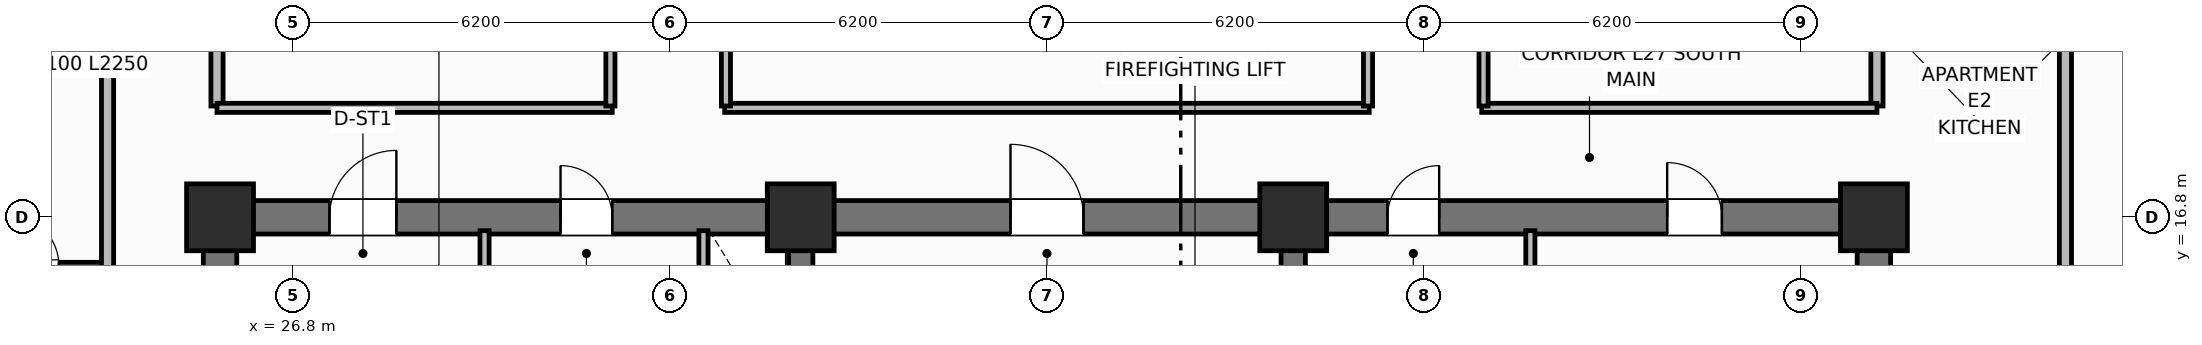
"""IFC4 building model, lengths in metres.
Left out: names, types, materials, properties, quantities, classifications, styles, units other than length and angle.
Written with IfcOpenShell. Run it as: python <this file> out.ifc"""

import sys

from ifc_helpers import new_model, si_unit, direction, frame, frame_2d, origin, origin_2d, place, context, subcontext, project, spatial, rectangle, extrude, element, fill, save


model = new_model("IFC4")
c1 = context("Model", 3, precision=1e-05, world=origin(), true_north=direction((0.0, 1.0)))
c2 = subcontext(c1, "Body", "Model", "MODEL_VIEW")
j1 = project(units=[si_unit("LENGTHUNIT", "METRE"), si_unit("PLANEANGLEUNIT", "RADIAN")], contexts=[c1])
p1 = place(None, origin())
s1 = spatial("IfcSite", under=j1, at=p1, CompositionType="ELEMENT")
p2 = place(p1, origin())
s2 = spatial("IfcBuilding", under=s1, at=p2, CompositionType="ELEMENT")
p3 = place(p2, frame((0.0, 0.0, 110.5)))
s3 = spatial("IfcBuildingStorey", under=s2, at=p3, CompositionType="ELEMENT", Elevation=110.5)
for number, where, z_axis, x_axis in (
    (1, (25.6, 10.875, 0.0), (0.0, 0.0, 1.0), (0.0, 1.0, 0.0)),
    (2, (52.8, 10.875, 0.0), (0.0, 0.0, 1.0), (0.0, 1.0, 0.0)),
):
    element("IfcWall", number, at=place(p3, frame(where, z_axis=z_axis, x_axis=x_axis)), inside=s3, PredefinedType="SHEAR", context=c2, shape_type="SweptSolid", body=[
        extrude(rectangle(XDim=5.65, YDim=0.55, at=frame_2d((2.825, 0.0))), origin(), (0.0, 0.0, 1.0), 3.7),
    ])
p4 = place(p3, frame((25.6, 16.8, 0.0), z_axis=(0.0, 0.0, 1.0), x_axis=(1.0, 0.0, 0.0)))
e3 = element("IfcWall", 3, at=p4, inside=s3, PredefinedType="SHEAR", context=c2, shape_type="SweptSolid", body=[
    extrude(rectangle(XDim=27.2, YDim=0.55, at=frame_2d((13.6, 0.0))), origin(), (0.0, 0.0, 1.0), 3.7),
])
p5 = place(p4, frame((1.8, 0.0, 0.0)))
e4 = element("IfcOpeningElement", 4, at=p5, cuts=e3, PredefinedType="OPENING", context=c2, shape_type="SweptSolid", body=[
    extrude(rectangle(XDim=1.1, YDim=2.15, at=frame_2d((0.55, 1.075))), frame((0.0, 0.285, 0.0), z_axis=(0.0, -1.0, 0.0), x_axis=(1.0, 0.0, 0.0)), (0.0, 0.0, 1.0), 0.57),
])
p6 = place(p4, frame((5.6, 0.0, 0.0)))
e5 = element("IfcOpeningElement", 5, at=p6, cuts=e3, PredefinedType="OPENING", context=c2, shape_type="SweptSolid", body=[
    extrude(rectangle(XDim=0.85, YDim=2.1, at=frame_2d((0.425, 1.05))), frame((0.0, 0.285, 0.0), z_axis=(0.0, -1.0, 0.0), x_axis=(1.0, 0.0, 0.0)), (0.0, 0.0, 1.0), 0.57),
])
p7 = place(p4, frame((13.0, 0.0, 0.0)))
e6 = element("IfcOpeningElement", 6, at=p7, cuts=e3, PredefinedType="OPENING", context=c2, shape_type="SweptSolid", body=[
    extrude(rectangle(XDim=1.2, YDim=2.15, at=frame_2d((0.6, 1.075))), frame((0.0, 0.285, 0.0), z_axis=(0.0, -1.0, 0.0), x_axis=(1.0, 0.0, 0.0)), (0.0, 0.0, 1.0), 0.57),
])
p8 = place(p4, frame((19.2, 0.0, 0.0)))
e7 = element("IfcOpeningElement", 7, at=p8, cuts=e3, PredefinedType="OPENING", context=c2, shape_type="SweptSolid", body=[
    extrude(rectangle(XDim=0.85, YDim=2.1, at=frame_2d((0.425, 1.05))), frame((0.0, 0.285, 0.0), z_axis=(0.0, -1.0, 0.0), x_axis=(1.0, 0.0, 0.0)), (0.0, 0.0, 1.0), 0.57),
])
p9 = place(p4, frame((23.8, 0.0, 0.0)))
e8 = element("IfcOpeningElement", 8, at=p9, cuts=e3, PredefinedType="OPENING", context=c2, shape_type="SweptSolid", body=[
    extrude(rectangle(XDim=0.9, YDim=2.1, at=frame_2d((0.45, 1.05))), frame((0.0, 0.285, 0.0), z_axis=(0.0, -1.0, 0.0), x_axis=(1.0, 0.0, 0.0)), (0.0, 0.0, 1.0), 0.57),
])
for number, where, z_axis, x_axis in (
    (9, (35.15, 10.875, 0.0), (0.0, 0.0, 1.0), (0.0, 1.0, 0.0)),
    (10, (43.25, 10.875, 0.0), (0.0, 0.0, 1.0), (0.0, 1.0, 0.0)),
):
    element("IfcWall", number, at=place(p3, frame(where, z_axis=z_axis, x_axis=x_axis)), inside=s3, PredefinedType="SHEAR", context=c2, shape_type="SweptSolid", body=[
        extrude(rectangle(XDim=5.65, YDim=0.4, at=frame_2d((2.825, 0.0))), origin(), (0.0, 0.0, 1.0), 3.7),
    ])
for number, where, z_axis, x_axis in (
    (11, (25.6, 16.8, 0.0), (0.0, 0.0, 1.0), (1.0, 0.0, 0.0)),
    (12, (35.15, 16.8, 0.0), (0.0, 0.0, 1.0), (1.0, 0.0, 0.0)),
    (13, (43.25, 16.8, 0.0), (0.0, 0.0, 1.0), (1.0, 0.0, 0.0)),
    (14, (52.8, 16.8, 0.0), (0.0, 0.0, 1.0), (1.0, 0.0, 0.0)),
):
    element("IfcColumn", number, at=place(p3, frame(where, z_axis=z_axis, x_axis=x_axis)), inside=s3, PredefinedType="COLUMN", context=c2, shape_type="SweptSolid", body=[
        extrude(rectangle(XDim=1.1, YDim=1.1, at=origin_2d()), origin(), (0.0, 0.0, 1.0), 3.7),
    ])
p10 = place(p3, frame((29.95, 14.5, 0.0), z_axis=(0.0, 0.0, 1.0), x_axis=(0.0, 1.0, 0.0)))
e15 = element("IfcWall", 15, at=p10, inside=s3, PredefinedType="PARTITIONING", context=c2, shape_type="SweptSolid", body=[
    extrude(rectangle(XDim=2.08, YDim=0.15, at=frame_2d((1.04, 0.0))), origin(), (0.0, 0.0, 1.0), 2.53),
])
p11 = place(p3, frame((33.55, 14.5, 0.0), z_axis=(0.0, 0.0, 1.0), x_axis=(0.0, 1.0, 0.0)))
e16 = element("IfcWall", 16, at=p11, inside=s3, PredefinedType="PARTITIONING", context=c2, shape_type="SweptSolid", body=[
    extrude(rectangle(XDim=2.08, YDim=0.15, at=frame_2d((1.04, 0.0))), origin(), (0.0, 0.0, 1.0), 2.53),
])
p12 = place(p11, frame((0.55, 0.0, 0.0)))
e17 = element("IfcOpeningElement", 17, at=p12, cuts=e16, PredefinedType="OPENING", context=c2, shape_type="SweptSolid", body=[
    extrude(rectangle(XDim=0.85, YDim=2.05, at=frame_2d((0.425, 1.025))), frame((0.0, 0.085, 0.0), z_axis=(0.0, -1.0, 0.0), x_axis=(1.0, 0.0, 0.0)), (0.0, 0.0, 1.0), 0.17),
])
p13 = place(p3, frame((47.15, 10.95, 0.0), z_axis=(0.0, 0.0, 1.0), x_axis=(0.0, 1.0, 0.0)))
e18 = element("IfcWall", 18, at=p13, inside=s3, PredefinedType="PARTITIONING", context=c2, shape_type="SweptSolid", body=[
    extrude(rectangle(XDim=5.63, YDim=0.15, at=frame_2d((2.815, 0.0))), origin(), (0.0, 0.0, 1.0), 2.53),
])
for number, where, z_axis, x_axis in (
    (19, (25.55, 18.63, 0.0), (0.0, 0.0, 1.0), (0.0, 1.0, 0.0)),
    (20, (52.85, 18.63, 0.0), (0.0, 0.0, 1.0), (0.0, 1.0, 0.0)),
):
    element("IfcWall", number, at=place(p3, frame(where, z_axis=z_axis, x_axis=x_axis)), inside=s3, PredefinedType="PARTITIONING", context=c2, shape_type="SweptSolid", body=[
        extrude(rectangle(XDim=19.14, YDim=0.2, at=frame_2d((9.57, 0.0))), origin(), (0.0, 0.0, 1.0), 2.53),
    ])
p14 = place(p3, frame((25.55, 18.6, 0.0), z_axis=(0.0, 0.0, 1.0), x_axis=(1.0, 0.0, 0.0)))
e21 = element("IfcWall", 21, at=p14, inside=s3, PredefinedType="PARTITIONING", context=c2, shape_type="SweptSolid", body=[
    extrude(rectangle(XDim=6.5, YDim=0.15, at=frame_2d((3.25, 0.0))), origin(), (0.0, 0.0, 1.0), 2.53),
])
p15 = place(p3, frame((33.9, 18.6, 0.0), z_axis=(0.0, 0.0, 1.0), x_axis=(1.0, 0.0, 0.0)))
e22 = element("IfcWall", 22, at=p15, inside=s3, PredefinedType="PARTITIONING", context=c2, shape_type="SweptSolid", body=[
    extrude(rectangle(XDim=10.6, YDim=0.15, at=frame_2d((5.3, 0.0))), origin(), (0.0, 0.0, 1.0), 2.53),
])
p16 = place(p3, frame((46.35, 18.6, 0.0), z_axis=(0.0, 0.0, 1.0), x_axis=(1.0, 0.0, 0.0)))
e23 = element("IfcWall", 23, at=p16, inside=s3, PredefinedType="PARTITIONING", context=c2, shape_type="SweptSolid", body=[
    extrude(rectangle(XDim=6.5, YDim=0.15, at=frame_2d((3.25, 0.0))), origin(), (0.0, 0.0, 1.0), 2.53),
])
p17 = place(p3, frame((32.02, 18.63, 0.0), z_axis=(0.0, 0.0, 1.0), x_axis=(0.0, 1.0, 0.0)))
e24 = element("IfcWall", 24, at=p17, inside=s3, PredefinedType="PARTITIONING", context=c2, shape_type="SweptSolid", body=[
    extrude(rectangle(XDim=19.14, YDim=0.15, at=frame_2d((9.57, 0.0))), origin(), (0.0, 0.0, 1.0), 2.53),
])
p18 = place(p17, frame((5.5, 0.0, 0.0)))
e25 = element("IfcOpeningElement", 25, at=p18, cuts=e24, PredefinedType="OPENING", context=c2, shape_type="SweptSolid", body=[
    extrude(rectangle(XDim=1.0, YDim=2.15, at=frame_2d((0.5, 1.075))), frame((0.0, 0.085, 0.0), z_axis=(0.0, -1.0, 0.0), x_axis=(1.0, 0.0, 0.0)), (0.0, 0.0, 1.0), 0.17),
])
p19 = place(p3, frame((33.92, 18.63, 0.0), z_axis=(0.0, 0.0, 1.0), x_axis=(0.0, 1.0, 0.0)))
e26 = element("IfcWall", 26, at=p19, inside=s3, PredefinedType="PARTITIONING", context=c2, shape_type="SweptSolid", body=[
    extrude(rectangle(XDim=19.14, YDim=0.15, at=frame_2d((9.57, 0.0))), origin(), (0.0, 0.0, 1.0), 2.53),
])
p20 = place(p19, frame((2.4, 0.0, 0.0)))
e27 = element("IfcOpeningElement", 27, at=p20, cuts=e26, PredefinedType="OPENING", context=c2, shape_type="SweptSolid", body=[
    extrude(rectangle(XDim=1.0, YDim=2.15, at=frame_2d((0.5, 1.075))), frame((0.0, 0.085, 0.0), z_axis=(0.0, -1.0, 0.0), x_axis=(1.0, 0.0, 0.0)), (0.0, 0.0, 1.0), 0.17),
])
p21 = place(p3, frame((44.48, 18.63, 0.0), z_axis=(0.0, 0.0, 1.0), x_axis=(0.0, 1.0, 0.0)))
e28 = element("IfcWall", 28, at=p21, inside=s3, PredefinedType="PARTITIONING", context=c2, shape_type="SweptSolid", body=[
    extrude(rectangle(XDim=19.14, YDim=0.15, at=frame_2d((9.57, 0.0))), origin(), (0.0, 0.0, 1.0), 2.53),
])
p22 = place(p21, frame((10.804, 0.0, 0.0)))
e29 = element("IfcOpeningElement", 29, at=p22, cuts=e28, PredefinedType="OPENING", context=c2, shape_type="SweptSolid", body=[
    extrude(rectangle(XDim=1.0, YDim=2.15, at=frame_2d((0.5, 1.075))), frame((0.0, 0.085, 0.0), z_axis=(0.0, -1.0, 0.0), x_axis=(1.0, 0.0, 0.0)), (0.0, 0.0, 1.0), 0.17),
])
p23 = place(p3, frame((46.38, 18.63, 0.0), z_axis=(0.0, 0.0, 1.0), x_axis=(0.0, 1.0, 0.0)))
e30 = element("IfcWall", 30, at=p23, inside=s3, PredefinedType="PARTITIONING", context=c2, shape_type="SweptSolid", body=[
    extrude(rectangle(XDim=19.14, YDim=0.15, at=frame_2d((9.57, 0.0))), origin(), (0.0, 0.0, 1.0), 2.53),
])
p24 = place(p23, frame((5.5, 0.0, 0.0)))
e31 = element("IfcOpeningElement", 31, at=p24, cuts=e30, PredefinedType="OPENING", context=c2, shape_type="SweptSolid", body=[
    extrude(rectangle(XDim=1.0, YDim=2.15, at=frame_2d((0.5, 1.075))), frame((0.0, 0.085, 0.0), z_axis=(0.0, -1.0, 0.0), x_axis=(1.0, 0.0, 0.0)), (0.0, 0.0, 1.0), 0.17),
])
p25 = place(p3, frame((21.5, 16.0, 0.0), z_axis=(0.0, 0.0, 1.0), x_axis=(1.0, 0.0, 0.0)))
e32 = element("IfcWall", 32, at=p25, inside=s3, PredefinedType="PARTITIONING", context=c2, shape_type="SweptSolid", body=[
    extrude(rectangle(XDim=2.25, YDim=0.12, at=frame_2d((1.125, 0.0))), origin(), (0.0, 0.0, 1.0), 2.53),
])
p26 = place(p25, frame((0.6, 0.0, 0.0)))
e33 = element("IfcOpeningElement", 33, at=p26, cuts=e32, PredefinedType="OPENING", context=c2, shape_type="SweptSolid", body=[
    extrude(rectangle(XDim=0.85, YDim=2.1, at=frame_2d((0.425, 1.05))), frame((0.0, 0.07, 0.0), z_axis=(0.0, -1.0, 0.0), x_axis=(1.0, 0.0, 0.0)), (0.0, 0.0, 1.0), 0.14),
])
p27 = place(p3, frame((23.75, 10.6, 0.0), z_axis=(0.0, 0.0, 1.0), x_axis=(0.0, 1.0, 0.0)))
e34 = element("IfcWall", 34, at=p27, inside=s3, PredefinedType="PARTITIONING", context=c2, shape_type="SweptSolid", body=[
    extrude(rectangle(XDim=35.2, YDim=0.2, at=frame_2d((17.6, 0.0))), origin(), (0.0, 0.0, 1.0), 2.53),
])
p28 = place(p27, frame((2.65, 0.0, 0.0)))
e35 = element("IfcOpeningElement", 35, at=p28, cuts=e34, PredefinedType="OPENING", context=c2, shape_type="SweptSolid", body=[
    extrude(rectangle(XDim=1.0, YDim=2.15, at=frame_2d((0.5, 1.075))), frame((0.0, 0.11, 0.0), z_axis=(0.0, -1.0, 0.0), x_axis=(1.0, 0.0, 0.0)), (0.0, 0.0, 1.0), 0.22),
])
p29 = place(p27, frame((12.87, 0.0, 0.0)))
e36 = element("IfcOpeningElement", 36, at=p29, cuts=e34, PredefinedType="OPENING", context=c2, shape_type="SweptSolid", body=[
    extrude(rectangle(XDim=1.0, YDim=2.15, at=frame_2d((0.5, 1.075))), frame((0.0, 0.11, 0.0), z_axis=(0.0, -1.0, 0.0), x_axis=(1.0, 0.0, 0.0)), (0.0, 0.0, 1.0), 0.22),
])
p30 = place(p27, frame((24.486, 0.0, 0.0)))
e37 = element("IfcOpeningElement", 37, at=p30, cuts=e34, PredefinedType="OPENING", context=c2, shape_type="SweptSolid", body=[
    extrude(rectangle(XDim=1.0, YDim=2.15, at=frame_2d((0.5, 1.075))), frame((0.0, 0.11, 0.0), z_axis=(0.0, -1.0, 0.0), x_axis=(1.0, 0.0, 0.0)), (0.0, 0.0, 1.0), 0.22),
])
p31 = place(p3, frame((55.95, 10.6, 0.0), z_axis=(0.0, 0.0, 1.0), x_axis=(0.0, 1.0, 0.0)))
e38 = element("IfcWall", 38, at=p31, inside=s3, PredefinedType="PARTITIONING", context=c2, shape_type="SweptSolid", body=[
    extrude(rectangle(XDim=35.2, YDim=0.2, at=frame_2d((17.6, 0.0))), origin(), (0.0, 0.0, 1.0), 2.53),
])
p32 = place(p31, frame((2.65, 0.0, 0.0)))
e39 = element("IfcOpeningElement", 39, at=p32, cuts=e38, PredefinedType="OPENING", context=c2, shape_type="SweptSolid", body=[
    extrude(rectangle(XDim=1.0, YDim=2.15, at=frame_2d((0.5, 1.075))), frame((0.0, 0.11, 0.0), z_axis=(0.0, -1.0, 0.0), x_axis=(1.0, 0.0, 0.0)), (0.0, 0.0, 1.0), 0.22),
])
p33 = place(p31, frame((11.352, 0.0, 0.0)))
e40 = element("IfcOpeningElement", 40, at=p33, cuts=e38, PredefinedType="OPENING", context=c2, shape_type="SweptSolid", body=[
    extrude(rectangle(XDim=1.0, YDim=2.15, at=frame_2d((0.5, 1.075))), frame((0.0, 0.11, 0.0), z_axis=(0.0, -1.0, 0.0), x_axis=(1.0, 0.0, 0.0)), (0.0, 0.0, 1.0), 0.22),
])
p34 = place(p31, frame((21.37, 0.0, 0.0)))
e41 = element("IfcOpeningElement", 41, at=p34, cuts=e38, PredefinedType="OPENING", context=c2, shape_type="SweptSolid", body=[
    extrude(rectangle(XDim=1.0, YDim=2.15, at=frame_2d((0.5, 1.075))), frame((0.0, 0.11, 0.0), z_axis=(0.0, -1.0, 0.0), x_axis=(1.0, 0.0, 0.0)), (0.0, 0.0, 1.0), 0.22),
])
p35 = place(p31, frame((27.302, 0.0, 0.0)))
e42 = element("IfcOpeningElement", 42, at=p35, cuts=e38, PredefinedType="OPENING", context=c2, shape_type="SweptSolid", body=[
    extrude(rectangle(XDim=1.0, YDim=2.15, at=frame_2d((0.5, 1.075))), frame((0.0, 0.11, 0.0), z_axis=(0.0, -1.0, 0.0), x_axis=(1.0, 0.0, 0.0)), (0.0, 0.0, 1.0), 0.22),
])
p36 = place(p26, origin())
e43 = element("IfcDoor", 43, at=p36, inside=s3, OperationType="SINGLE_SWING_LEFT", PredefinedType="DOOR", context=c2, shape_type="SweptSolid", body=[
    extrude(rectangle(XDim=0.85, YDim=2.1, at=frame_2d((0.425, 1.05))), frame((0.0, 0.025, 0.0), z_axis=(0.0, -1.0, 0.0), x_axis=(1.0, 0.0, 0.0)), (0.0, 0.0, 1.0), 0.05),
])
fill(e33, e43)
p37 = place(p5, origin())
e44 = element("IfcDoor", 44, at=p37, inside=s3, OperationType="SINGLE_SWING_RIGHT", PredefinedType="DOOR", context=c2, shape_type="SweptSolid", body=[
    extrude(rectangle(XDim=1.1, YDim=2.15, at=frame_2d((0.55, 1.075))), frame((0.0, 0.025, 0.0), z_axis=(0.0, -1.0, 0.0), x_axis=(1.0, 0.0, 0.0)), (0.0, 0.0, 1.0), 0.05),
])
fill(e4, e44)
p38 = place(p6, origin())
e45 = element("IfcDoor", 45, at=p38, inside=s3, OperationType="SINGLE_SWING_LEFT", PredefinedType="DOOR", context=c2, shape_type="SweptSolid", body=[
    extrude(rectangle(XDim=0.85, YDim=2.1, at=frame_2d((0.425, 1.05))), frame((0.0, 0.025, 0.0), z_axis=(0.0, -1.0, 0.0), x_axis=(1.0, 0.0, 0.0)), (0.0, 0.0, 1.0), 0.05),
])
fill(e5, e45)
p39 = place(p7, origin())
e46 = element("IfcDoor", 46, at=p39, inside=s3, OperationType="SINGLE_SWING_LEFT", PredefinedType="DOOR", context=c2, shape_type="SweptSolid", body=[
    extrude(rectangle(XDim=1.2, YDim=2.15, at=frame_2d((0.6, 1.075))), frame((0.0, 0.025, 0.0), z_axis=(0.0, -1.0, 0.0), x_axis=(1.0, 0.0, 0.0)), (0.0, 0.0, 1.0), 0.05),
])
fill(e6, e46)
p40 = place(p8, origin())
e47 = element("IfcDoor", 47, at=p40, inside=s3, OperationType="SINGLE_SWING_RIGHT", PredefinedType="DOOR", context=c2, shape_type="SweptSolid", body=[
    extrude(rectangle(XDim=0.85, YDim=2.1, at=frame_2d((0.425, 1.05))), frame((0.0, 0.025, 0.0), z_axis=(0.0, -1.0, 0.0), x_axis=(1.0, 0.0, 0.0)), (0.0, 0.0, 1.0), 0.05),
])
fill(e7, e47)
p41 = place(p9, origin())
e48 = element("IfcDoor", 48, at=p41, inside=s3, OperationType="SINGLE_SWING_LEFT", PredefinedType="DOOR", context=c2, shape_type="SweptSolid", body=[
    extrude(rectangle(XDim=0.9, YDim=2.1, at=frame_2d((0.45, 1.05))), frame((0.0, 0.025, 0.0), z_axis=(0.0, -1.0, 0.0), x_axis=(1.0, 0.0, 0.0)), (0.0, 0.0, 1.0), 0.05),
])
fill(e8, e48)
save(model, sys.argv[1])
